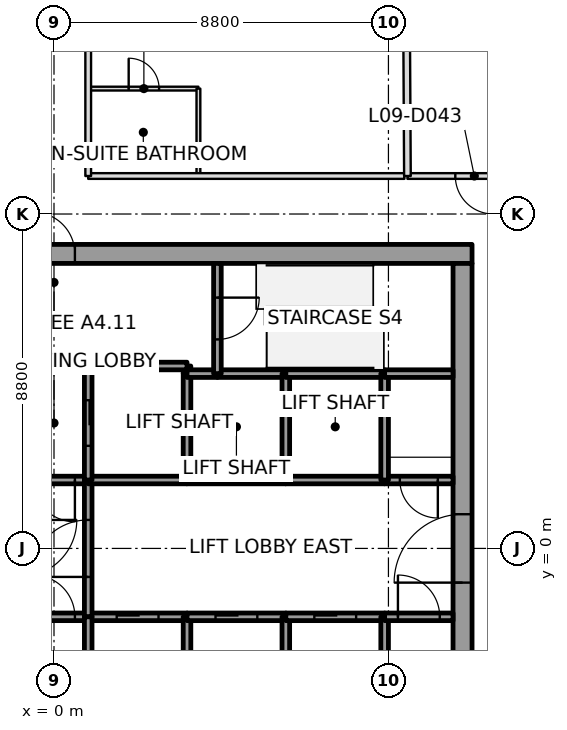
"""IFC4 building model, lengths in metres.
Left out: names, types, materials, properties, quantities, classifications, styles, units other than length and angle.
Written with IfcOpenShell. Run it as: python <this file> out.ifc"""

import sys

from ifc_helpers import new_model, si_unit, direction, frame, frame_2d, origin, place, context, subcontext, project, spatial, rectangle, extrude, element, fill, save


model = new_model("IFC4")
c1 = context("Model", 3, precision=1e-05, world=origin(), true_north=direction((0.0, 1.0)))
c2 = subcontext(c1, "Body", "Model", "MODEL_VIEW")
j1 = project(units=[si_unit("LENGTHUNIT", "METRE"), si_unit("PLANEANGLEUNIT", "RADIAN")], contexts=[c1])
p1 = place(None, origin())
s1 = spatial("IfcSite", under=j1, at=p1, CompositionType="ELEMENT")
p2 = place(p1, origin())
s2 = spatial("IfcBuilding", under=s1, at=p2, CompositionType="ELEMENT")
p3 = place(p2, frame((0.0, 0.0, 55.4)))
s3 = spatial("IfcBuildingStorey", under=s2, at=p3, CompositionType="ELEMENT", Elevation=55.4)
p4 = place(p3, frame((-11.0, 7.75, 0.0), z_axis=(0.0, 0.0, 1.0), x_axis=(1.0, 0.0, 0.0)))
e1 = element("IfcWall", 1, at=p4, inside=s3, PredefinedType="SHEAR", context=c2, shape_type="SweptSolid", body=[
    extrude(rectangle(XDim=22.0, YDim=0.5, at=frame_2d((11.0, 0.0))), origin(), (0.0, 0.0, 1.0), 3.7),
])
p5 = place(p4, frame((10.45, 0.0, 0.0)))
e2 = element("IfcOpeningElement", 2, at=p5, cuts=e1, PredefinedType="OPENING", context=c2, shape_type="SweptSolid", body=[
    extrude(rectangle(XDim=1.1, YDim=2.1, at=frame_2d((0.55, 1.05))), frame((0.0, 0.25, 0.0), z_axis=(0.0, -1.0, 0.0), x_axis=(1.0, 0.0, 0.0)), (0.0, 0.0, 1.0), 0.5),
])
p6 = place(p3, frame((10.75, -7.5, 0.0), z_axis=(0.0, 0.0, 1.0), x_axis=(0.0, 1.0, 0.0)))
e3 = element("IfcWall", 3, at=p6, inside=s3, PredefinedType="SHEAR", context=c2, shape_type="SweptSolid", body=[
    extrude(rectangle(XDim=15.0, YDim=0.5, at=frame_2d((7.5, 0.0))), origin(), (0.0, 0.0, 1.0), 3.7),
])
p7 = place(p6, frame((6.6, 0.0, 0.0)))
e4 = element("IfcOpeningElement", 4, at=p7, cuts=e3, PredefinedType="OPENING", context=c2, shape_type="SweptSolid", body=[
    extrude(rectangle(XDim=1.8, YDim=2.1, at=frame_2d((0.9, 1.05))), frame((0.0, 0.25, 0.0), z_axis=(0.0, -1.0, 0.0), x_axis=(1.0, 0.0, 0.0)), (0.0, 0.0, 1.0), 0.5),
])
p8 = place(p3, frame((-0.9, -1.8, 0.0), z_axis=(0.0, 0.0, 1.0), x_axis=(1.0, 0.0, 0.0)))
e5 = element("IfcWall", 5, at=p8, inside=s3, PredefinedType="SOLIDWALL", context=c2, shape_type="SweptSolid", body=[
    extrude(rectangle(XDim=1.8, YDim=0.2, at=frame_2d((0.9, 0.0))), origin(), (0.0, 0.0, 1.0), 3.55),
])
p9 = place(p8, frame((0.35, 0.0, 0.0)))
e6 = element("IfcOpeningElement", 6, at=p9, cuts=e5, PredefinedType="OPENING", context=c2, shape_type="SweptSolid", body=[
    extrude(rectangle(XDim=1.1, YDim=2.1, at=frame_2d((0.55, 1.05))), frame((0.0, 0.1, 0.0), z_axis=(0.0, -1.0, 0.0), x_axis=(1.0, 0.0, 0.0)), (0.0, 0.0, 1.0), 0.2),
])
p10 = place(p3, frame((0.9, 1.8, 0.0), z_axis=(0.0, 0.0, 1.0), x_axis=(-1.0, 0.0, 0.0)))
e7 = element("IfcWall", 7, at=p10, inside=s3, PredefinedType="SOLIDWALL", context=c2, shape_type="SweptSolid", body=[
    extrude(rectangle(XDim=1.8, YDim=0.2, at=frame_2d((0.9, 0.0))), origin(), (0.0, 0.0, 1.0), 3.55),
])
p11 = place(p10, frame((0.35, 0.0, 0.0)))
e8 = element("IfcOpeningElement", 8, at=p11, cuts=e7, PredefinedType="OPENING", context=c2, shape_type="SweptSolid", body=[
    extrude(rectangle(XDim=1.1, YDim=2.1, at=frame_2d((0.55, 1.05))), frame((0.0, 0.1, 0.0), z_axis=(0.0, -1.0, 0.0), x_axis=(1.0, 0.0, 0.0)), (0.0, 0.0, 1.0), 0.2),
])
p12 = place(p3, frame((0.9, -1.8, 0.0), z_axis=(0.0, 0.0, 1.0), x_axis=(1.0, 0.0, 0.0)))
e9 = element("IfcWall", 9, at=p12, inside=s3, PredefinedType="SOLIDWALL", context=c2, shape_type="SweptSolid", body=[
    extrude(rectangle(XDim=2.6, YDim=0.2, at=frame_2d((1.3, 0.0))), origin(), (0.0, 0.0, 1.0), 3.55),
])
p13 = place(p12, frame((0.75, 0.0, 0.0)))
e10 = element("IfcOpeningElement", 10, at=p13, cuts=e9, PredefinedType="OPENING", context=c2, shape_type="SweptSolid", body=[
    extrude(rectangle(XDim=1.1, YDim=2.1, at=frame_2d((0.55, 1.05))), frame((0.0, 0.1, 0.0), z_axis=(0.0, -1.0, 0.0), x_axis=(1.0, 0.0, 0.0)), (0.0, 0.0, 1.0), 0.2),
])
p14 = place(p3, frame((0.9, -1.8, 0.0), z_axis=(0.0, 0.0, 1.0), x_axis=(0.0, 1.0, 0.0)))
e11 = element("IfcWall", 11, at=p14, inside=s3, PredefinedType="SOLIDWALL", context=c2, shape_type="SweptSolid", body=[
    extrude(rectangle(XDim=3.6, YDim=0.2, at=frame_2d((1.8, 0.0))), origin(), (0.0, 0.0, 1.0), 3.55),
])
p15 = place(p14, frame((1.05, 0.0, 0.0)))
e12 = element("IfcOpeningElement", 12, at=p15, cuts=e11, PredefinedType="OPENING", context=c2, shape_type="SweptSolid", body=[
    extrude(rectangle(XDim=1.5, YDim=2.1, at=frame_2d((0.75, 1.05))), frame((0.0, 0.1, 0.0), z_axis=(0.0, -1.0, 0.0), x_axis=(1.0, 0.0, 0.0)), (0.0, 0.0, 1.0), 0.2),
])
p16 = place(p3, frame((0.9, -1.8, 0.0), z_axis=(0.0, 0.0, 1.0), x_axis=(0.0, -1.0, 0.0)))
e13 = element("IfcWall", 13, at=p16, inside=s3, PredefinedType="SOLIDWALL", context=c2, shape_type="SweptSolid", body=[
    extrude(rectangle(XDim=2.8, YDim=0.2, at=frame_2d((1.4, 0.0))), origin(), (0.0, 0.0, 1.0), 3.55),
])
p17 = place(p3, frame((3.5, 1.8, 0.0), z_axis=(0.0, 0.0, 1.0), x_axis=(-1.0, 0.0, 0.0)))
e14 = element("IfcWall", 14, at=p17, inside=s3, PredefinedType="SOLIDWALL", context=c2, shape_type="SweptSolid", body=[
    extrude(rectangle(XDim=2.6, YDim=0.2, at=frame_2d((1.3, 0.0))), origin(), (0.0, 0.0, 1.0), 3.55),
])
p18 = place(p3, frame((3.5, 4.6, 0.0), z_axis=(0.0, 0.0, 1.0), x_axis=(0.0, 1.0, 0.0)))
e15 = element("IfcWall", 15, at=p18, inside=s3, PredefinedType="SOLIDWALL", context=c2, shape_type="SweptSolid", body=[
    extrude(rectangle(XDim=0.2, YDim=0.2, at=frame_2d((0.1, 0.0))), origin(), (0.0, 0.0, 1.0), 3.55),
])
p19 = place(p3, frame((3.5, 4.8, 0.0), z_axis=(0.0, 0.0, 1.0), x_axis=(-1.0, 0.0, 0.0)))
e16 = element("IfcWall", 16, at=p19, inside=s3, PredefinedType="SOLIDWALL", context=c2, shape_type="SweptSolid", body=[
    extrude(rectangle(XDim=2.6, YDim=0.2, at=frame_2d((1.3, 0.0))), origin(), (0.0, 0.0, 1.0), 3.55),
])
p20 = place(p3, frame((0.9, 4.8, 0.0), z_axis=(0.0, 0.0, 1.0), x_axis=(0.0, -1.0, 0.0)))
e17 = element("IfcWall", 17, at=p20, inside=s3, PredefinedType="SOLIDWALL", context=c2, shape_type="SweptSolid", body=[
    extrude(rectangle(XDim=3.0, YDim=0.2, at=frame_2d((1.5, 0.0))), origin(), (0.0, 0.0, 1.0), 3.55),
])
p21 = place(p20, frame((0.9, 0.0, 0.0)))
e18 = element("IfcOpeningElement", 18, at=p21, cuts=e17, PredefinedType="OPENING", context=c2, shape_type="SweptSolid", body=[
    extrude(rectangle(XDim=1.2, YDim=2.1, at=frame_2d((0.6, 1.05))), frame((0.0, 0.1, 0.0), z_axis=(0.0, -1.0, 0.0), x_axis=(1.0, 0.0, 0.0)), (0.0, 0.0, 1.0), 0.2),
])
p22 = place(p3, frame((3.5, -4.6, 0.0), z_axis=(0.0, 0.0, 1.0), x_axis=(0.0, 1.0, 0.0)))
e19 = element("IfcWall", 19, at=p22, inside=s3, PredefinedType="SOLIDWALL", context=c2, shape_type="SweptSolid", body=[
    extrude(rectangle(XDim=2.8, YDim=0.2, at=frame_2d((1.4, 0.0))), origin(), (0.0, 0.0, 1.0), 3.55),
])
p23 = place(p3, frame((3.5, -1.8, 0.0), z_axis=(0.0, 0.0, 1.0), x_axis=(1.0, 0.0, 0.0)))
e20 = element("IfcWall", 20, at=p23, inside=s3, PredefinedType="SOLIDWALL", context=c2, shape_type="SweptSolid", body=[
    extrude(rectangle(XDim=2.6, YDim=0.2, at=frame_2d((1.3, 0.0))), origin(), (0.0, 0.0, 1.0), 3.55),
])
p24 = place(p23, frame((0.75, 0.0, 0.0)))
e21 = element("IfcOpeningElement", 21, at=p24, cuts=e20, PredefinedType="OPENING", context=c2, shape_type="SweptSolid", body=[
    extrude(rectangle(XDim=1.1, YDim=2.1, at=frame_2d((0.55, 1.05))), frame((0.0, 0.1, 0.0), z_axis=(0.0, -1.0, 0.0), x_axis=(1.0, 0.0, 0.0)), (0.0, 0.0, 1.0), 0.2),
])
p25 = place(p3, frame((6.1, 1.8, 0.0), z_axis=(0.0, 0.0, 1.0), x_axis=(-1.0, 0.0, 0.0)))
e22 = element("IfcWall", 22, at=p25, inside=s3, PredefinedType="SOLIDWALL", context=c2, shape_type="SweptSolid", body=[
    extrude(rectangle(XDim=2.6, YDim=0.2, at=frame_2d((1.3, 0.0))), origin(), (0.0, 0.0, 1.0), 3.55),
])
p26 = place(p3, frame((3.5, 1.8, 0.0), z_axis=(0.0, 0.0, 1.0), x_axis=(0.0, 1.0, 0.0)))
e23 = element("IfcWall", 23, at=p26, inside=s3, PredefinedType="SOLIDWALL", context=c2, shape_type="SweptSolid", body=[
    extrude(rectangle(XDim=2.8, YDim=0.2, at=frame_2d((1.4, 0.0))), origin(), (0.0, 0.0, 1.0), 3.55),
])
p27 = place(p3, frame((4.3, 4.6, 0.0), z_axis=(0.0, 0.0, 1.0), x_axis=(-1.0, 0.0, 0.0)))
e24 = element("IfcWall", 24, at=p27, inside=s3, PredefinedType="SOLIDWALL", context=c2, shape_type="SweptSolid", body=[
    extrude(rectangle(XDim=0.8, YDim=0.2, at=frame_2d((0.4, 0.0))), origin(), (0.0, 0.0, 1.0), 3.55),
])
p28 = place(p3, frame((6.1, 4.6, 0.0), z_axis=(0.0, 0.0, 1.0), x_axis=(-1.0, 0.0, 0.0)))
e25 = element("IfcWall", 25, at=p28, inside=s3, PredefinedType="SOLIDWALL", context=c2, shape_type="SweptSolid", body=[
    extrude(rectangle(XDim=1.8, YDim=0.2, at=frame_2d((0.9, 0.0))), origin(), (0.0, 0.0, 1.0), 3.55),
])
p29 = place(p3, frame((4.3, 7.5, 0.0), z_axis=(0.0, 0.0, 1.0), x_axis=(0.0, -1.0, 0.0)))
e26 = element("IfcWall", 26, at=p29, inside=s3, PredefinedType="SOLIDWALL", context=c2, shape_type="SweptSolid", body=[
    extrude(rectangle(XDim=2.9, YDim=0.2, at=frame_2d((1.45, 0.0))), origin(), (0.0, 0.0, 1.0), 3.55),
])
p30 = place(p29, frame((0.9, 0.0, 0.0)))
e27 = element("IfcOpeningElement", 27, at=p30, cuts=e26, PredefinedType="OPENING", context=c2, shape_type="SweptSolid", body=[
    extrude(rectangle(XDim=1.1, YDim=2.1, at=frame_2d((0.55, 1.05))), frame((0.0, 0.1, 0.0), z_axis=(0.0, -1.0, 0.0), x_axis=(1.0, 0.0, 0.0)), (0.0, 0.0, 1.0), 0.2),
])
p31 = place(p3, frame((6.1, -4.6, 0.0), z_axis=(0.0, 0.0, 1.0), x_axis=(0.0, 1.0, 0.0)))
e28 = element("IfcWall", 28, at=p31, inside=s3, PredefinedType="SOLIDWALL", context=c2, shape_type="SweptSolid", body=[
    extrude(rectangle(XDim=2.8, YDim=0.2, at=frame_2d((1.4, 0.0))), origin(), (0.0, 0.0, 1.0), 3.55),
])
p32 = place(p3, frame((6.1, -1.8, 0.0), z_axis=(0.0, 0.0, 1.0), x_axis=(1.0, 0.0, 0.0)))
e29 = element("IfcWall", 29, at=p32, inside=s3, PredefinedType="SOLIDWALL", context=c2, shape_type="SweptSolid", body=[
    extrude(rectangle(XDim=2.6, YDim=0.2, at=frame_2d((1.3, 0.0))), origin(), (0.0, 0.0, 1.0), 3.55),
])
p33 = place(p32, frame((0.75, 0.0, 0.0)))
e30 = element("IfcOpeningElement", 30, at=p33, cuts=e29, PredefinedType="OPENING", context=c2, shape_type="SweptSolid", body=[
    extrude(rectangle(XDim=1.1, YDim=2.1, at=frame_2d((0.55, 1.05))), frame((0.0, 0.1, 0.0), z_axis=(0.0, -1.0, 0.0), x_axis=(1.0, 0.0, 0.0)), (0.0, 0.0, 1.0), 0.2),
])
p34 = place(p3, frame((8.7, 1.8, 0.0), z_axis=(0.0, 0.0, 1.0), x_axis=(-1.0, 0.0, 0.0)))
e31 = element("IfcWall", 31, at=p34, inside=s3, PredefinedType="SOLIDWALL", context=c2, shape_type="SweptSolid", body=[
    extrude(rectangle(XDim=2.6, YDim=0.2, at=frame_2d((1.3, 0.0))), origin(), (0.0, 0.0, 1.0), 3.55),
])
p35 = place(p3, frame((6.1, 1.8, 0.0), z_axis=(0.0, 0.0, 1.0), x_axis=(0.0, 1.0, 0.0)))
e32 = element("IfcWall", 32, at=p35, inside=s3, PredefinedType="SOLIDWALL", context=c2, shape_type="SweptSolid", body=[
    extrude(rectangle(XDim=2.8, YDim=0.2, at=frame_2d((1.4, 0.0))), origin(), (0.0, 0.0, 1.0), 3.55),
])
p36 = place(p3, frame((8.7, 4.6, 0.0), z_axis=(0.0, 0.0, 1.0), x_axis=(-1.0, 0.0, 0.0)))
e33 = element("IfcWall", 33, at=p36, inside=s3, PredefinedType="SOLIDWALL", context=c2, shape_type="SweptSolid", body=[
    extrude(rectangle(XDim=2.6, YDim=0.2, at=frame_2d((1.3, 0.0))), origin(), (0.0, 0.0, 1.0), 3.55),
])
p37 = place(p3, frame((8.7, -1.8, 0.0), z_axis=(0.0, 0.0, 1.0), x_axis=(0.0, -1.0, 0.0)))
e34 = element("IfcWall", 34, at=p37, inside=s3, PredefinedType="SOLIDWALL", context=c2, shape_type="SweptSolid", body=[
    extrude(rectangle(XDim=2.8, YDim=0.2, at=frame_2d((1.4, 0.0))), origin(), (0.0, 0.0, 1.0), 3.55),
])
p38 = place(p3, frame((8.7, -1.8, 0.0), z_axis=(0.0, 0.0, 1.0), x_axis=(1.0, 0.0, 0.0)))
e35 = element("IfcWall", 35, at=p38, inside=s3, PredefinedType="SOLIDWALL", context=c2, shape_type="SweptSolid", body=[
    extrude(rectangle(XDim=1.8, YDim=0.2, at=frame_2d((0.9, 0.0))), origin(), (0.0, 0.0, 1.0), 3.55),
])
p39 = place(p38, frame((0.35, 0.0, 0.0)))
e36 = element("IfcOpeningElement", 36, at=p39, cuts=e35, PredefinedType="OPENING", context=c2, shape_type="SweptSolid", body=[
    extrude(rectangle(XDim=1.1, YDim=2.1, at=frame_2d((0.55, 1.05))), frame((0.0, 0.1, 0.0), z_axis=(0.0, -1.0, 0.0), x_axis=(1.0, 0.0, 0.0)), (0.0, 0.0, 1.0), 0.2),
])
p40 = place(p3, frame((10.5, 1.8, 0.0), z_axis=(0.0, 0.0, 1.0), x_axis=(-1.0, 0.0, 0.0)))
e37 = element("IfcWall", 37, at=p40, inside=s3, PredefinedType="SOLIDWALL", context=c2, shape_type="SweptSolid", body=[
    extrude(rectangle(XDim=1.8, YDim=0.2, at=frame_2d((0.9, 0.0))), origin(), (0.0, 0.0, 1.0), 3.55),
])
p41 = place(p40, frame((0.4, 0.0, 0.0)))
e38 = element("IfcOpeningElement", 38, at=p41, cuts=e37, PredefinedType="OPENING", context=c2, shape_type="SweptSolid", body=[
    extrude(rectangle(XDim=1.0, YDim=2.1, at=frame_2d((0.5, 1.05))), frame((0.0, 0.1, 0.0), z_axis=(0.0, -1.0, 0.0), x_axis=(1.0, 0.0, 0.0)), (0.0, 0.0, 1.0), 0.2),
])
p42 = place(p3, frame((8.7, 4.6, 0.0), z_axis=(0.0, 0.0, 1.0), x_axis=(0.0, -1.0, 0.0)))
e39 = element("IfcWall", 39, at=p42, inside=s3, PredefinedType="SOLIDWALL", context=c2, shape_type="SweptSolid", body=[
    extrude(rectangle(XDim=2.8, YDim=0.2, at=frame_2d((1.4, 0.0))), origin(), (0.0, 0.0, 1.0), 3.55),
])
p43 = place(p3, frame((10.5, 4.6, 0.0), z_axis=(0.0, 0.0, 1.0), x_axis=(-1.0, 0.0, 0.0)))
e40 = element("IfcWall", 40, at=p43, inside=s3, PredefinedType="SOLIDWALL", context=c2, shape_type="SweptSolid", body=[
    extrude(rectangle(XDim=1.8, YDim=0.2, at=frame_2d((0.9, 0.0))), origin(), (0.0, 0.0, 1.0), 3.55),
])
p44 = place(p3, frame((9.203, 27.505, 0.0), z_axis=(0.0, 0.0, 1.0), x_axis=(0.005488058554, -0.999984940493, 0.0)))
e41 = element("IfcWall", 41, at=p44, inside=s3, PredefinedType="PARTITIONING", context=c2, shape_type="SweptSolid", body=[
    extrude(rectangle(XDim=17.705, YDim=0.175, at=frame_2d((8.853, 0.0))), origin(), (0.0, 0.0, 1.0), 2.947),
])
p45 = place(p3, frame((9.22, 9.8, 0.0), z_axis=(0.0, 0.0, 1.0), x_axis=(-1.0, 0.0, 0.0)))
e42 = element("IfcWall", 42, at=p45, inside=s3, PredefinedType="PARTITIONING", context=c2, shape_type="SweptSolid", body=[
    extrude(rectangle(XDim=8.32, YDim=0.15, at=frame_2d((4.16, 0.0))), origin(), (0.0, 0.0, 1.0), 2.947),
])
p46 = place(p3, frame((0.9, 9.8, 0.0), z_axis=(0.0, 0.0, 1.0), x_axis=(0.0, 1.0, 0.0)))
e43 = element("IfcWall", 43, at=p46, inside=s3, PredefinedType="PARTITIONING", context=c2, shape_type="SweptSolid", body=[
    extrude(rectangle(XDim=17.695, YDim=0.15, at=frame_2d((8.847, 0.0))), origin(), (0.0, 0.0, 1.0), 2.947),
])
p47 = place(p46, frame((9.547, 0.0, 0.0)))
e44 = element("IfcOpeningElement", 44, at=p47, cuts=e43, PredefinedType="OPENING", context=c2, shape_type="SweptSolid", body=[
    extrude(rectangle(XDim=1.0, YDim=2.1, at=frame_2d((0.5, 1.05))), frame((0.0, 0.075, 0.0), z_axis=(0.0, -1.0, 0.0), x_axis=(1.0, 0.0, 0.0)), (0.0, 0.0, 1.0), 0.15),
])
p48 = place(p3, frame((12.72, 9.8, 0.0), z_axis=(0.0, 0.0, 1.0), x_axis=(-1.0, 0.0, 0.0)))
e45 = element("IfcWall", 45, at=p48, inside=s3, PredefinedType="PARTITIONING", context=c2, shape_type="SweptSolid", body=[
    extrude(rectangle(XDim=3.42, YDim=0.15, at=frame_2d((1.71, 0.0))), origin(), (0.0, 0.0, 1.0), 3.0),
])
p49 = place(p48, frame((1.16, 0.0, 0.0)))
e46 = element("IfcOpeningElement", 46, at=p49, cuts=e45, PredefinedType="OPENING", context=c2, shape_type="SweptSolid", body=[
    extrude(rectangle(XDim=1.0, YDim=2.1, at=frame_2d((0.5, 1.05))), frame((0.0, 0.075, 0.0), z_axis=(0.0, -1.0, 0.0), x_axis=(1.0, 0.0, 0.0)), (0.0, 0.0, 1.0), 0.15),
])
p50 = place(p3, frame((0.93, 12.1, 0.0), z_axis=(0.0, 0.0, 1.0), x_axis=(1.0, 0.0, 0.0)))
e47 = element("IfcWall", 47, at=p50, inside=s3, PredefinedType="PARTITIONING", context=c2, shape_type="SweptSolid", body=[
    extrude(rectangle(XDim=2.87, YDim=0.1, at=frame_2d((1.435, 0.0))), origin(), (0.0, 0.0, 1.0), 3.0),
])
p51 = place(p50, frame((1.035, 0.0, 0.0)))
e48 = element("IfcOpeningElement", 48, at=p51, cuts=e47, PredefinedType="OPENING", context=c2, shape_type="SweptSolid", body=[
    extrude(rectangle(XDim=0.8, YDim=2.1, at=frame_2d((0.4, 1.05))), frame((0.0, 0.05, 0.0), z_axis=(0.0, -1.0, 0.0), x_axis=(1.0, 0.0, 0.0)), (0.0, 0.0, 1.0), 0.1),
])
p52 = place(p3, frame((3.8, 12.1, 0.0), z_axis=(0.0, 0.0, 1.0), x_axis=(0.0, -1.0, 0.0)))
e49 = element("IfcWall", 49, at=p52, inside=s3, PredefinedType="PARTITIONING", context=c2, shape_type="SweptSolid", body=[
    extrude(rectangle(XDim=2.27, YDim=0.1, at=frame_2d((1.135, 0.0))), origin(), (0.0, 0.0, 1.0), 3.0),
])
p53 = place(p49, origin())
e50 = element("IfcDoor", 50, at=p53, inside=s3, OperationType="SINGLE_SWING_LEFT", PredefinedType="DOOR", context=c2, shape_type="SweptSolid", body=[
    extrude(rectangle(XDim=1.0, YDim=2.1, at=frame_2d((0.5, 1.05))), frame((0.0, 0.025, 0.0), z_axis=(0.0, -1.0, 0.0), x_axis=(1.0, 0.0, 0.0)), (0.0, 0.0, 1.0), 0.05),
])
fill(e46, e50)
p54 = place(p51, origin())
e51 = element("IfcDoor", 51, at=p54, inside=s3, OperationType="SINGLE_SWING_LEFT", PredefinedType="DOOR", context=c2, shape_type="SweptSolid", body=[
    extrude(rectangle(XDim=0.8, YDim=2.1, at=frame_2d((0.4, 1.05))), frame((0.0, 0.025, 0.0), z_axis=(0.0, -1.0, 0.0), x_axis=(1.0, 0.0, 0.0)), (0.0, 0.0, 1.0), 0.05),
])
fill(e48, e51)
p55 = place(p13, origin())
e52 = element("IfcDoor", 52, at=p55, inside=s3, OperationType="SLIDING_TO_RIGHT", PredefinedType="DOOR", context=c2, shape_type="SweptSolid", body=[
    extrude(rectangle(XDim=1.1, YDim=2.1, at=frame_2d((0.55, 1.05))), frame((0.0, 0.025, 0.0), z_axis=(0.0, -1.0, 0.0), x_axis=(1.0, 0.0, 0.0)), (0.0, 0.0, 1.0), 0.05),
])
fill(e10, e52)
p56 = place(p24, origin())
e53 = element("IfcDoor", 53, at=p56, inside=s3, OperationType="SLIDING_TO_RIGHT", PredefinedType="DOOR", context=c2, shape_type="SweptSolid", body=[
    extrude(rectangle(XDim=1.1, YDim=2.1, at=frame_2d((0.55, 1.05))), frame((0.0, 0.025, 0.0), z_axis=(0.0, -1.0, 0.0), x_axis=(1.0, 0.0, 0.0)), (0.0, 0.0, 1.0), 0.05),
])
fill(e21, e53)
p57 = place(p33, origin())
e54 = element("IfcDoor", 54, at=p57, inside=s3, OperationType="SLIDING_TO_LEFT", PredefinedType="DOOR", context=c2, shape_type="SweptSolid", body=[
    extrude(rectangle(XDim=1.1, YDim=2.1, at=frame_2d((0.55, 1.05))), frame((0.0, 0.025, 0.0), z_axis=(0.0, -1.0, 0.0), x_axis=(1.0, 0.0, 0.0)), (0.0, 0.0, 1.0), 0.05),
])
fill(e30, e54)
p58 = place(p21, origin())
e55 = element("IfcDoor", 55, at=p58, inside=s3, OperationType="SLIDING_TO_RIGHT", PredefinedType="DOOR", context=c2, shape_type="SweptSolid", body=[
    extrude(rectangle(XDim=1.2, YDim=2.1, at=frame_2d((0.6, 1.05))), frame((0.0, 0.025, 0.0), z_axis=(0.0, -1.0, 0.0), x_axis=(1.0, 0.0, 0.0)), (0.0, 0.0, 1.0), 0.05),
])
fill(e18, e55)
p59 = place(p15, origin())
e56 = element("IfcDoor", 56, at=p59, inside=s3, OperationType="DOUBLE_DOOR_SINGLE_SWING", PredefinedType="DOOR", context=c2, shape_type="SweptSolid", body=[
    extrude(rectangle(XDim=1.5, YDim=2.1, at=frame_2d((0.75, 1.05))), frame((0.0, 0.025, 0.0), z_axis=(0.0, -1.0, 0.0), x_axis=(1.0, 0.0, 0.0)), (0.0, 0.0, 1.0), 0.05),
])
fill(e12, e56)
p60 = place(p39, origin())
e57 = element("IfcDoor", 57, at=p60, inside=s3, OperationType="SINGLE_SWING_LEFT", PredefinedType="DOOR", context=c2, shape_type="SweptSolid", body=[
    extrude(rectangle(XDim=1.1, YDim=2.1, at=frame_2d((0.55, 1.05))), frame((0.0, 0.025, 0.0), z_axis=(0.0, -1.0, 0.0), x_axis=(1.0, 0.0, 0.0)), (0.0, 0.0, 1.0), 0.05),
])
fill(e36, e57)
p61 = place(p11, origin())
e58 = element("IfcDoor", 58, at=p61, inside=s3, OperationType="SINGLE_SWING_RIGHT", PredefinedType="DOOR", context=c2, shape_type="SweptSolid", body=[
    extrude(rectangle(XDim=1.1, YDim=2.1, at=frame_2d((0.55, 1.05))), frame((0.0, 0.025, 0.0), z_axis=(0.0, -1.0, 0.0), x_axis=(1.0, 0.0, 0.0)), (0.0, 0.0, 1.0), 0.05),
])
fill(e8, e58)
p62 = place(p9, origin())
e59 = element("IfcDoor", 59, at=p62, inside=s3, OperationType="SINGLE_SWING_RIGHT", PredefinedType="DOOR", context=c2, shape_type="SweptSolid", body=[
    extrude(rectangle(XDim=1.1, YDim=2.1, at=frame_2d((0.55, 1.05))), frame((0.0, 0.025, 0.0), z_axis=(0.0, -1.0, 0.0), x_axis=(1.0, 0.0, 0.0)), (0.0, 0.0, 1.0), 0.05),
])
fill(e6, e59)
p63 = place(p41, origin())
e60 = element("IfcDoor", 60, at=p63, inside=s3, OperationType="SINGLE_SWING_LEFT", PredefinedType="DOOR", context=c2, shape_type="SweptSolid", body=[
    extrude(rectangle(XDim=1.0, YDim=2.1, at=frame_2d((0.5, 1.05))), frame((0.0, 0.025, 0.0), z_axis=(0.0, -1.0, 0.0), x_axis=(1.0, 0.0, 0.0)), (0.0, 0.0, 1.0), 0.05),
])
fill(e38, e60)
p64 = place(p30, origin())
e61 = element("IfcDoor", 61, at=p64, inside=s3, OperationType="SINGLE_SWING_LEFT", PredefinedType="DOOR", context=c2, shape_type="SweptSolid", body=[
    extrude(rectangle(XDim=1.1, YDim=2.1, at=frame_2d((0.55, 1.05))), frame((0.0, 0.025, 0.0), z_axis=(0.0, -1.0, 0.0), x_axis=(1.0, 0.0, 0.0)), (0.0, 0.0, 1.0), 0.05),
])
fill(e27, e61)
p65 = place(p7, origin())
e62 = element("IfcDoor", 62, at=p65, inside=s3, OperationType="DOUBLE_DOOR_SINGLE_SWING", PredefinedType="DOOR", context=c2, shape_type="SweptSolid", body=[
    extrude(rectangle(XDim=1.8, YDim=2.1, at=frame_2d((0.9, 1.05))), frame((0.0, 0.025, 0.0), z_axis=(0.0, -1.0, 0.0), x_axis=(1.0, 0.0, 0.0)), (0.0, 0.0, 1.0), 0.05),
])
fill(e4, e62)
p66 = place(p5, origin())
e63 = element("IfcDoor", 63, at=p66, inside=s3, OperationType="SINGLE_SWING_RIGHT", PredefinedType="DOOR", context=c2, shape_type="SweptSolid", body=[
    extrude(rectangle(XDim=1.1, YDim=2.1, at=frame_2d((0.55, 1.05))), frame((0.0, 0.025, 0.0), z_axis=(0.0, -1.0, 0.0), x_axis=(1.0, 0.0, 0.0)), (0.0, 0.0, 1.0), 0.05),
])
fill(e2, e63)
save(model, sys.argv[1])
